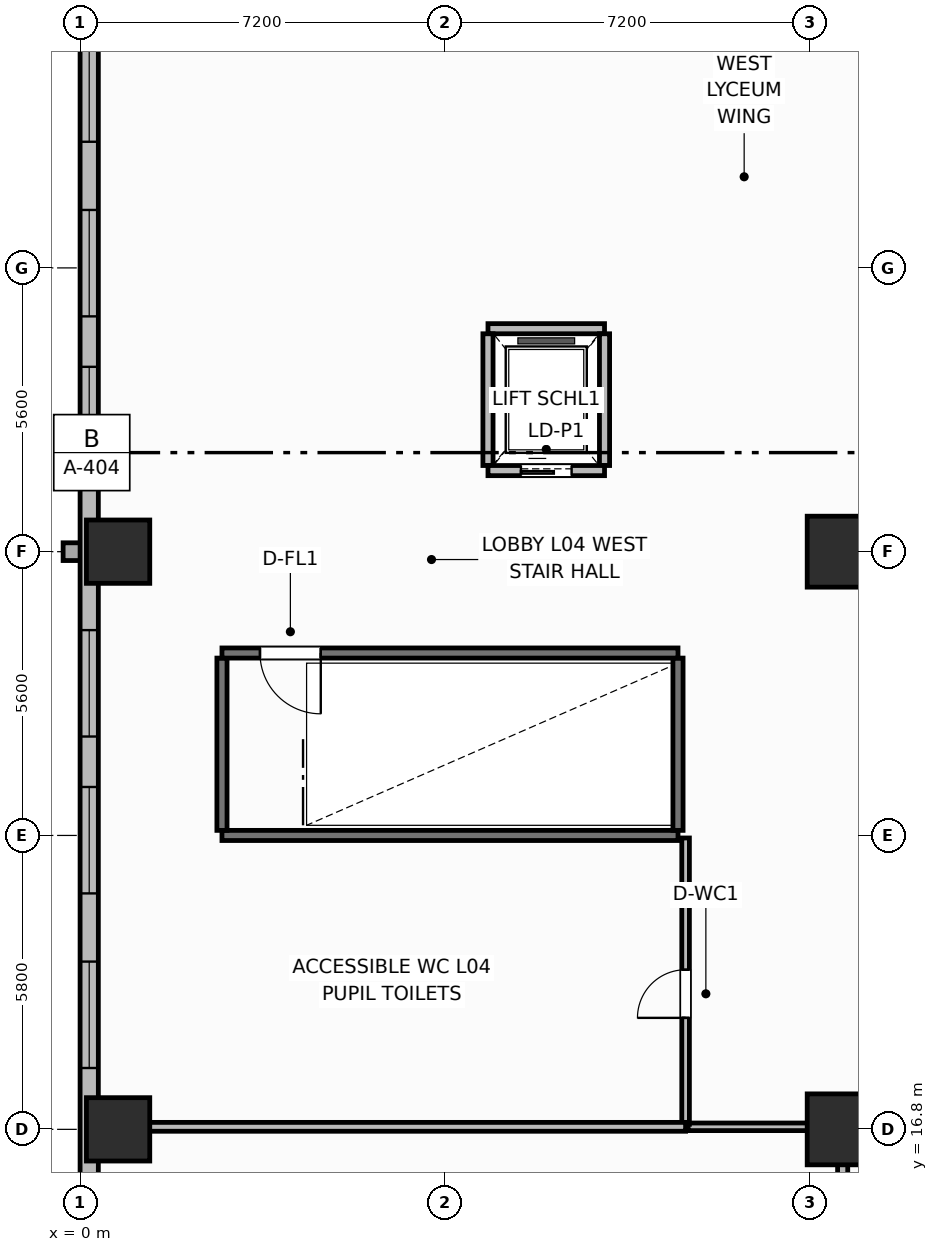
"""IFC4 building model, lengths in metres.
Left out: names, types, materials, properties, quantities, classifications, styles, units other than length and angle.
Written with IfcOpenShell. Run it as: python <this file> out.ifc"""

import sys

from ifc_helpers import new_model, si_unit, direction, frame, frame_2d, origin, origin_2d, place, context, subcontext, project, spatial, rectangle, extrude, element, fill, save


model = new_model("IFC4")
c1 = context("Model", 3, precision=1e-05, world=origin(), true_north=direction((0.0, 1.0)))
c2 = subcontext(c1, "Body", "Model", "MODEL_VIEW")
j1 = project(units=[si_unit("LENGTHUNIT", "METRE"), si_unit("PLANEANGLEUNIT", "RADIAN")], contexts=[c1])
p1 = place(None, origin())
s1 = spatial("IfcSite", under=j1, at=p1, CompositionType="ELEMENT")
p2 = place(p1, origin())
s2 = spatial("IfcBuilding", under=s1, at=p2, CompositionType="ELEMENT")
p3 = place(p2, frame((0.0, 0.0, 20.1)))
s3 = spatial("IfcBuildingStorey", under=s2, at=p3, CompositionType="ELEMENT", Elevation=20.1)
for number, where, z_axis, x_axis in (
    (1, (0.75, 16.8, 0.0), (0.0, 0.0, 1.0), (1.0, 0.0, 0.0)),
    (2, (0.75, 28.2, 0.0), (0.0, 0.0, 1.0), (1.0, 0.0, 0.0)),
):
    element("IfcColumn", number, at=place(p3, frame(where, z_axis=z_axis, x_axis=x_axis)), inside=s3, PredefinedType="COLUMN", context=c2, shape_type="SweptSolid", body=[
        extrude(rectangle(XDim=1.25, YDim=1.25, at=origin_2d()), origin(), (0.0, 0.0, 1.0), 4.5),
    ])
for number, where, z_axis, x_axis in (
    (3, (15.05, 16.8, 0.0), (0.0, 0.0, 1.0), (1.0, 0.0, 0.0)),
    (4, (15.05, 28.2, 0.0), (0.0, 0.0, 1.0), (1.0, 0.0, 0.0)),
):
    element("IfcColumn", number, at=place(p3, frame(where, z_axis=z_axis, x_axis=x_axis)), inside=s3, PredefinedType="COLUMN", context=c2, shape_type="SweptSolid", body=[
        extrude(rectangle(XDim=1.4, YDim=1.4, at=origin_2d()), origin(), (0.0, 0.0, 1.0), 4.5),
    ])
p4 = place(p3, frame((0.18, 55.42, 0.0), z_axis=(0.0, 0.0, 1.0), x_axis=(0.0, -1.0, 0.0)))
e5 = element("IfcWall", 5, at=p4, inside=s3, PredefinedType="SOLIDWALL", context=c2, shape_type="SweptSolid", body=[
    extrude(rectangle(XDim=54.44, YDim=0.36, at=frame_2d((27.22, 0.0))), origin(), (0.0, 0.0, 1.0), 2.3),
])
p5 = place(p4, frame((1.498, 0.0, 0.3)))
e6 = element("IfcOpeningElement", 6, at=p5, cuts=e5, PredefinedType="OPENING", context=c2, shape_type="SweptSolid", body=[
    extrude(rectangle(XDim=2.1, YDim=2.2, at=frame_2d((1.05, 1.1))), frame((0.0, 0.19, 0.0), z_axis=(0.0, -1.0, 0.0), x_axis=(1.0, 0.0, 0.0)), (0.0, 0.0, 1.0), 0.38),
])
p6 = place(p4, frame((5.294, 0.0, 0.3)))
e7 = element("IfcOpeningElement", 7, at=p6, cuts=e5, PredefinedType="OPENING", context=c2, shape_type="SweptSolid", body=[
    extrude(rectangle(XDim=2.1, YDim=2.2, at=frame_2d((1.05, 1.1))), frame((0.0, 0.19, 0.0), z_axis=(0.0, -1.0, 0.0), x_axis=(1.0, 0.0, 0.0)), (0.0, 0.0, 1.0), 0.38),
])
p7 = place(p4, frame((12.185, 0.0, 0.3)))
e8 = element("IfcOpeningElement", 8, at=p7, cuts=e5, PredefinedType="OPENING", context=c2, shape_type="SweptSolid", body=[
    extrude(rectangle(XDim=2.1, YDim=2.2, at=frame_2d((1.05, 1.1))), frame((0.0, 0.19, 0.0), z_axis=(0.0, -1.0, 0.0), x_axis=(1.0, 0.0, 0.0)), (0.0, 0.0, 1.0), 0.38),
])
p8 = place(p4, frame((17.031, 0.0, 0.3)))
e9 = element("IfcOpeningElement", 9, at=p8, cuts=e5, PredefinedType="OPENING", context=c2, shape_type="SweptSolid", body=[
    extrude(rectangle(XDim=2.1, YDim=2.2, at=frame_2d((1.05, 1.1))), frame((0.0, 0.19, 0.0), z_axis=(0.0, -1.0, 0.0), x_axis=(1.0, 0.0, 0.0)), (0.0, 0.0, 1.0), 0.38),
])
p9 = place(p4, frame((20.476, 0.0, 0.3)))
e10 = element("IfcOpeningElement", 10, at=p9, cuts=e5, PredefinedType="OPENING", context=c2, shape_type="SweptSolid", body=[
    extrude(rectangle(XDim=2.1, YDim=2.2, at=frame_2d((1.05, 1.1))), frame((0.0, 0.19, 0.0), z_axis=(0.0, -1.0, 0.0), x_axis=(1.0, 0.0, 0.0)), (0.0, 0.0, 1.0), 0.38),
])
p10 = place(p4, frame((23.572, 0.0, 0.3)))
e11 = element("IfcOpeningElement", 11, at=p10, cuts=e5, PredefinedType="OPENING", context=c2, shape_type="SweptSolid", body=[
    extrude(rectangle(XDim=2.1, YDim=2.2, at=frame_2d((1.05, 1.1))), frame((0.0, 0.19, 0.0), z_axis=(0.0, -1.0, 0.0), x_axis=(1.0, 0.0, 0.0)), (0.0, 0.0, 1.0), 0.38),
])
p11 = place(p4, frame((28.768, 0.0, 0.3)))
e12 = element("IfcOpeningElement", 12, at=p11, cuts=e5, PredefinedType="OPENING", context=c2, shape_type="SweptSolid", body=[
    extrude(rectangle(XDim=2.1, YDim=2.2, at=frame_2d((1.05, 1.1))), frame((0.0, 0.19, 0.0), z_axis=(0.0, -1.0, 0.0), x_axis=(1.0, 0.0, 0.0)), (0.0, 0.0, 1.0), 0.38),
])
p12 = place(p4, frame((31.864, 0.0, 0.3)))
e13 = element("IfcOpeningElement", 13, at=p12, cuts=e5, PredefinedType="OPENING", context=c2, shape_type="SweptSolid", body=[
    extrude(rectangle(XDim=2.1, YDim=2.2, at=frame_2d((1.05, 1.1))), frame((0.0, 0.19, 0.0), z_axis=(0.0, -1.0, 0.0), x_axis=(1.0, 0.0, 0.0)), (0.0, 0.0, 1.0), 0.38),
])
p13 = place(p4, frame((35.309, 0.0, 0.3)))
e14 = element("IfcOpeningElement", 14, at=p13, cuts=e5, PredefinedType="OPENING", context=c2, shape_type="SweptSolid", body=[
    extrude(rectangle(XDim=2.1, YDim=2.2, at=frame_2d((1.05, 1.1))), frame((0.0, 0.19, 0.0), z_axis=(0.0, -1.0, 0.0), x_axis=(1.0, 0.0, 0.0)), (0.0, 0.0, 1.0), 0.38),
])
p14 = place(p4, frame((40.155, 0.0, 0.3)))
e15 = element("IfcOpeningElement", 15, at=p14, cuts=e5, PredefinedType="OPENING", context=c2, shape_type="SweptSolid", body=[
    extrude(rectangle(XDim=2.1, YDim=2.2, at=frame_2d((1.05, 1.1))), frame((0.0, 0.19, 0.0), z_axis=(0.0, -1.0, 0.0), x_axis=(1.0, 0.0, 0.0)), (0.0, 0.0, 1.0), 0.38),
])
p15 = place(p4, frame((47.046, 0.0, 0.3)))
e16 = element("IfcOpeningElement", 16, at=p15, cuts=e5, PredefinedType="OPENING", context=c2, shape_type="SweptSolid", body=[
    extrude(rectangle(XDim=2.1, YDim=2.2, at=frame_2d((1.05, 1.1))), frame((0.0, 0.19, 0.0), z_axis=(0.0, -1.0, 0.0), x_axis=(1.0, 0.0, 0.0)), (0.0, 0.0, 1.0), 0.38),
])
p16 = place(p4, frame((50.842, 0.0, 0.3)))
e17 = element("IfcOpeningElement", 17, at=p16, cuts=e5, PredefinedType="OPENING", context=c2, shape_type="SweptSolid", body=[
    extrude(rectangle(XDim=2.1, YDim=2.2, at=frame_2d((1.05, 1.1))), frame((0.0, 0.19, 0.0), z_axis=(0.0, -1.0, 0.0), x_axis=(1.0, 0.0, 0.0)), (0.0, 0.0, 1.0), 0.38),
])
p17 = place(p3, frame((2.8, 22.6, 0.0), z_axis=(0.0, 0.0, 1.0), x_axis=(1.0, 0.0, 0.0)))
e18 = element("IfcWall", 18, at=p17, inside=s3, PredefinedType="SHEAR", context=c2, shape_type="SweptSolid", body=[
    extrude(rectangle(XDim=9.0, YDim=0.2, at=frame_2d((4.5, 0.0))), origin(), (0.0, 0.0, 1.0), 4.5),
])
for number, where, z_axis, x_axis in (
    (19, (2.8, 22.7, 0.0), (0.0, 0.0, 1.0), (0.0, 1.0, 0.0)),
    (20, (11.8, 22.7, 0.0), (0.0, 0.0, 1.0), (0.0, 1.0, 0.0)),
):
    element("IfcWall", number, at=place(p3, frame(where, z_axis=z_axis, x_axis=x_axis)), inside=s3, PredefinedType="SHEAR", context=c2, shape_type="SweptSolid", body=[
        extrude(rectangle(XDim=3.4, YDim=0.2, at=frame_2d((1.7, 0.0))), origin(), (0.0, 0.0, 1.0), 4.5),
    ])
p18 = place(p3, frame((11.8, 26.2, 0.0), z_axis=(0.0, 0.0, 1.0), x_axis=(-1.0, 0.0, 0.0)))
e21 = element("IfcWall", 21, at=p18, inside=s3, PredefinedType="SHEAR", context=c2, shape_type="SweptSolid", body=[
    extrude(rectangle(XDim=9.0, YDim=0.2, at=frame_2d((4.5, 0.0))), origin(), (0.0, 0.0, 1.0), 4.5),
])
p19 = place(p18, frame((7.05, 0.0, 0.0)))
e22 = element("IfcOpeningElement", 22, at=p19, cuts=e21, PredefinedType="OPENING", context=c2, shape_type="SweptSolid", body=[
    extrude(rectangle(XDim=1.2, YDim=2.15, at=frame_2d((0.6, 1.075))), frame((0.0, 0.11, 0.0), z_axis=(0.0, -1.0, 0.0), x_axis=(1.0, 0.0, 0.0)), (0.0, 0.0, 1.0), 0.22),
])
p20 = place(p3, frame((8.05, 32.6, 0.0), z_axis=(0.0, 0.0, 1.0), x_axis=(1.0, 0.0, 0.0)))
e23 = element("IfcWall", 23, at=p20, inside=s3, PredefinedType="PARTITIONING", context=c2, shape_type="SweptSolid", body=[
    extrude(rectangle(XDim=2.3, YDim=0.2, at=frame_2d((1.15, 0.0))), origin(), (0.0, 0.0, 1.0), 2.26),
])
for number, where, z_axis, x_axis in (
    (24, (8.05, 29.9, 0.0), (0.0, 0.0, 1.0), (0.0, 1.0, 0.0)),
    (25, (10.35, 29.9, 0.0), (0.0, 0.0, 1.0), (0.0, 1.0, 0.0)),
):
    element("IfcWall", number, at=place(p3, frame(where, z_axis=z_axis, x_axis=x_axis)), inside=s3, PredefinedType="PARTITIONING", context=c2, shape_type="SweptSolid", body=[
        extrude(rectangle(XDim=2.6, YDim=0.2, at=frame_2d((1.3, 0.0))), origin(), (0.0, 0.0, 1.0), 2.26),
    ])
p21 = place(p3, frame((8.05, 29.8, 0.0), z_axis=(0.0, 0.0, 1.0), x_axis=(1.0, 0.0, 0.0)))
e26 = element("IfcWall", 26, at=p21, inside=s3, PredefinedType="PARTITIONING", context=c2, shape_type="SweptSolid", body=[
    extrude(rectangle(XDim=2.3, YDim=0.2, at=frame_2d((1.15, 0.0))), origin(), (0.0, 0.0, 1.0), 2.26),
])
p22 = place(p21, frame((0.65, 0.0, 0.0)))
e27 = element("IfcOpeningElement", 27, at=p22, cuts=e26, PredefinedType="OPENING", context=c2, shape_type="SweptSolid", body=[
    extrude(rectangle(XDim=1.0, YDim=2.15, at=frame_2d((0.5, 1.075))), frame((0.0, 0.11, 0.0), z_axis=(0.0, -1.0, 0.0), x_axis=(1.0, 0.0, 0.0)), (0.0, 0.0, 1.0), 0.22),
])
p23 = place(p3, frame((15.05, 0.4, 0.0), z_axis=(0.0, 0.0, 1.0), x_axis=(0.0, 1.0, 0.0)))
e28 = element("IfcWall", 28, at=p23, inside=s3, PredefinedType="PARTITIONING", context=c2, shape_type="SweptSolid", body=[
    extrude(rectangle(XDim=16.4, YDim=0.2, at=frame_2d((8.2, 0.0))), origin(), (0.0, 0.0, 1.0), 2.26),
])
p24 = place(p23, frame((5.5, 0.0, 0.0)))
e29 = element("IfcOpeningElement", 29, at=p24, cuts=e28, PredefinedType="OPENING", context=c2, shape_type="SweptSolid", body=[
    extrude(rectangle(XDim=1.0, YDim=2.15, at=frame_2d((0.5, 1.075))), frame((0.0, 0.11, 0.0), z_axis=(0.0, -1.0, 0.0), x_axis=(1.0, 0.0, 0.0)), (0.0, 0.0, 1.0), 0.22),
])
p25 = place(p3, frame((12.0, 16.85, 0.0), z_axis=(0.0, 0.0, 1.0), x_axis=(1.0, 0.0, 0.0)))
e30 = element("IfcWall", 30, at=p25, inside=s3, PredefinedType="PARTITIONING", context=c2, shape_type="SweptSolid", body=[
    extrude(rectangle(XDim=13.25, YDim=0.15, at=frame_2d((6.625, 0.0))), origin(), (0.0, 0.0, 1.0), 2.26),
])
p26 = place(p25, frame((7.5, 0.0, 0.0)))
e31 = element("IfcOpeningElement", 31, at=p26, cuts=e30, PredefinedType="OPENING", context=c2, shape_type="SweptSolid", body=[
    extrude(rectangle(XDim=1.0, YDim=2.15, at=frame_2d((0.5, 1.075))), frame((0.0, 0.085, 0.0), z_axis=(0.0, -1.0, 0.0), x_axis=(1.0, 0.0, 0.0)), (0.0, 0.0, 1.0), 0.17),
])
p27 = place(p3, frame((11.95, 16.9, 0.0), z_axis=(0.0, 0.0, 1.0), x_axis=(0.0, 1.0, 0.0)))
e32 = element("IfcWall", 32, at=p27, inside=s3, PredefinedType="PARTITIONING", context=c2, shape_type="SweptSolid", body=[
    extrude(rectangle(XDim=5.65, YDim=0.15, at=frame_2d((2.825, 0.0))), origin(), (0.0, 0.0, 1.0), 2.26),
])
p28 = place(p27, frame((2.1, 0.0, 0.0)))
e33 = element("IfcOpeningElement", 33, at=p28, cuts=e32, PredefinedType="OPENING", context=c2, shape_type="SweptSolid", body=[
    extrude(rectangle(XDim=0.95, YDim=2.1, at=frame_2d((0.475, 1.05))), frame((0.0, 0.085, 0.0), z_axis=(0.0, -1.0, 0.0), x_axis=(1.0, 0.0, 0.0)), (0.0, 0.0, 1.0), 0.17),
])
p29 = place(p3, frame((0.4, 16.85, 0.0), z_axis=(0.0, 0.0, 1.0), x_axis=(1.0, 0.0, 0.0)))
e34 = element("IfcWall", 34, at=p29, inside=s3, PredefinedType="PARTITIONING", context=c2, shape_type="SweptSolid", body=[
    extrude(rectangle(XDim=11.55, YDim=0.175, at=frame_2d((5.775, 0.0))), origin(), (0.0, 0.0, 1.0), 2.26),
])
p30 = place(p8, origin())
e35 = element("IfcWindow", 35, at=p30, inside=s3, PartitioningType="SINGLE_PANEL", PredefinedType="WINDOW", context=c2, shape_type="SweptSolid", body=[
    extrude(rectangle(XDim=2.1, YDim=2.2, at=frame_2d((1.05, 1.1))), frame((0.0, 0.03, 0.0), z_axis=(0.0, -1.0, 0.0), x_axis=(1.0, 0.0, 0.0)), (0.0, 0.0, 1.0), 0.06),
])
fill(e9, e35)
p31 = place(p9, origin())
e36 = element("IfcWindow", 36, at=p31, inside=s3, PartitioningType="SINGLE_PANEL", PredefinedType="WINDOW", context=c2, shape_type="SweptSolid", body=[
    extrude(rectangle(XDim=2.1, YDim=2.2, at=frame_2d((1.05, 1.1))), frame((0.0, 0.03, 0.0), z_axis=(0.0, -1.0, 0.0), x_axis=(1.0, 0.0, 0.0)), (0.0, 0.0, 1.0), 0.06),
])
fill(e10, e36)
p32 = place(p10, origin())
e37 = element("IfcWindow", 37, at=p32, inside=s3, PartitioningType="SINGLE_PANEL", PredefinedType="WINDOW", context=c2, shape_type="SweptSolid", body=[
    extrude(rectangle(XDim=2.1, YDim=2.2, at=frame_2d((1.05, 1.1))), frame((0.0, 0.03, 0.0), z_axis=(0.0, -1.0, 0.0), x_axis=(1.0, 0.0, 0.0)), (0.0, 0.0, 1.0), 0.06),
])
fill(e11, e37)
p33 = place(p11, origin())
e38 = element("IfcWindow", 38, at=p33, inside=s3, PartitioningType="SINGLE_PANEL", PredefinedType="WINDOW", context=c2, shape_type="SweptSolid", body=[
    extrude(rectangle(XDim=2.1, YDim=2.2, at=frame_2d((1.05, 1.1))), frame((0.0, 0.03, 0.0), z_axis=(0.0, -1.0, 0.0), x_axis=(1.0, 0.0, 0.0)), (0.0, 0.0, 1.0), 0.06),
])
fill(e12, e38)
p34 = place(p12, origin())
e39 = element("IfcWindow", 39, at=p34, inside=s3, PartitioningType="SINGLE_PANEL", PredefinedType="WINDOW", context=c2, shape_type="SweptSolid", body=[
    extrude(rectangle(XDim=2.1, YDim=2.2, at=frame_2d((1.05, 1.1))), frame((0.0, 0.03, 0.0), z_axis=(0.0, -1.0, 0.0), x_axis=(1.0, 0.0, 0.0)), (0.0, 0.0, 1.0), 0.06),
])
fill(e13, e39)
p35 = place(p13, origin())
e40 = element("IfcWindow", 40, at=p35, inside=s3, PartitioningType="SINGLE_PANEL", PredefinedType="WINDOW", context=c2, shape_type="SweptSolid", body=[
    extrude(rectangle(XDim=2.1, YDim=2.2, at=frame_2d((1.05, 1.1))), frame((0.0, 0.03, 0.0), z_axis=(0.0, -1.0, 0.0), x_axis=(1.0, 0.0, 0.0)), (0.0, 0.0, 1.0), 0.06),
])
fill(e14, e40)
p36 = place(p19, origin())
e41 = element("IfcDoor", 41, at=p36, inside=s3, OperationType="SINGLE_SWING_LEFT", PredefinedType="DOOR", context=c2, shape_type="SweptSolid", body=[
    extrude(rectangle(XDim=1.2, YDim=2.15, at=frame_2d((0.6, 1.075))), frame((0.0, 0.025, 0.0), z_axis=(0.0, -1.0, 0.0), x_axis=(1.0, 0.0, 0.0)), (0.0, 0.0, 1.0), 0.05),
])
fill(e22, e41)
p37 = place(p22, origin())
e42 = element("IfcDoor", 42, at=p37, inside=s3, OperationType="SLIDING_TO_LEFT", PredefinedType="DOOR", context=c2, shape_type="SweptSolid", body=[
    extrude(rectangle(XDim=1.0, YDim=2.15, at=frame_2d((0.5, 1.075))), frame((0.0, 0.025, 0.0), z_axis=(0.0, -1.0, 0.0), x_axis=(1.0, 0.0, 0.0)), (0.0, 0.0, 1.0), 0.05),
])
fill(e27, e42)
p38 = place(p28, origin())
e43 = element("IfcDoor", 43, at=p38, inside=s3, OperationType="SINGLE_SWING_LEFT", PredefinedType="DOOR", context=c2, shape_type="SweptSolid", body=[
    extrude(rectangle(XDim=0.95, YDim=2.1, at=frame_2d((0.475, 1.05))), frame((0.0, 0.025, 0.0), z_axis=(0.0, -1.0, 0.0), x_axis=(1.0, 0.0, 0.0)), (0.0, 0.0, 1.0), 0.05),
])
fill(e33, e43)
save(model, sys.argv[1])
